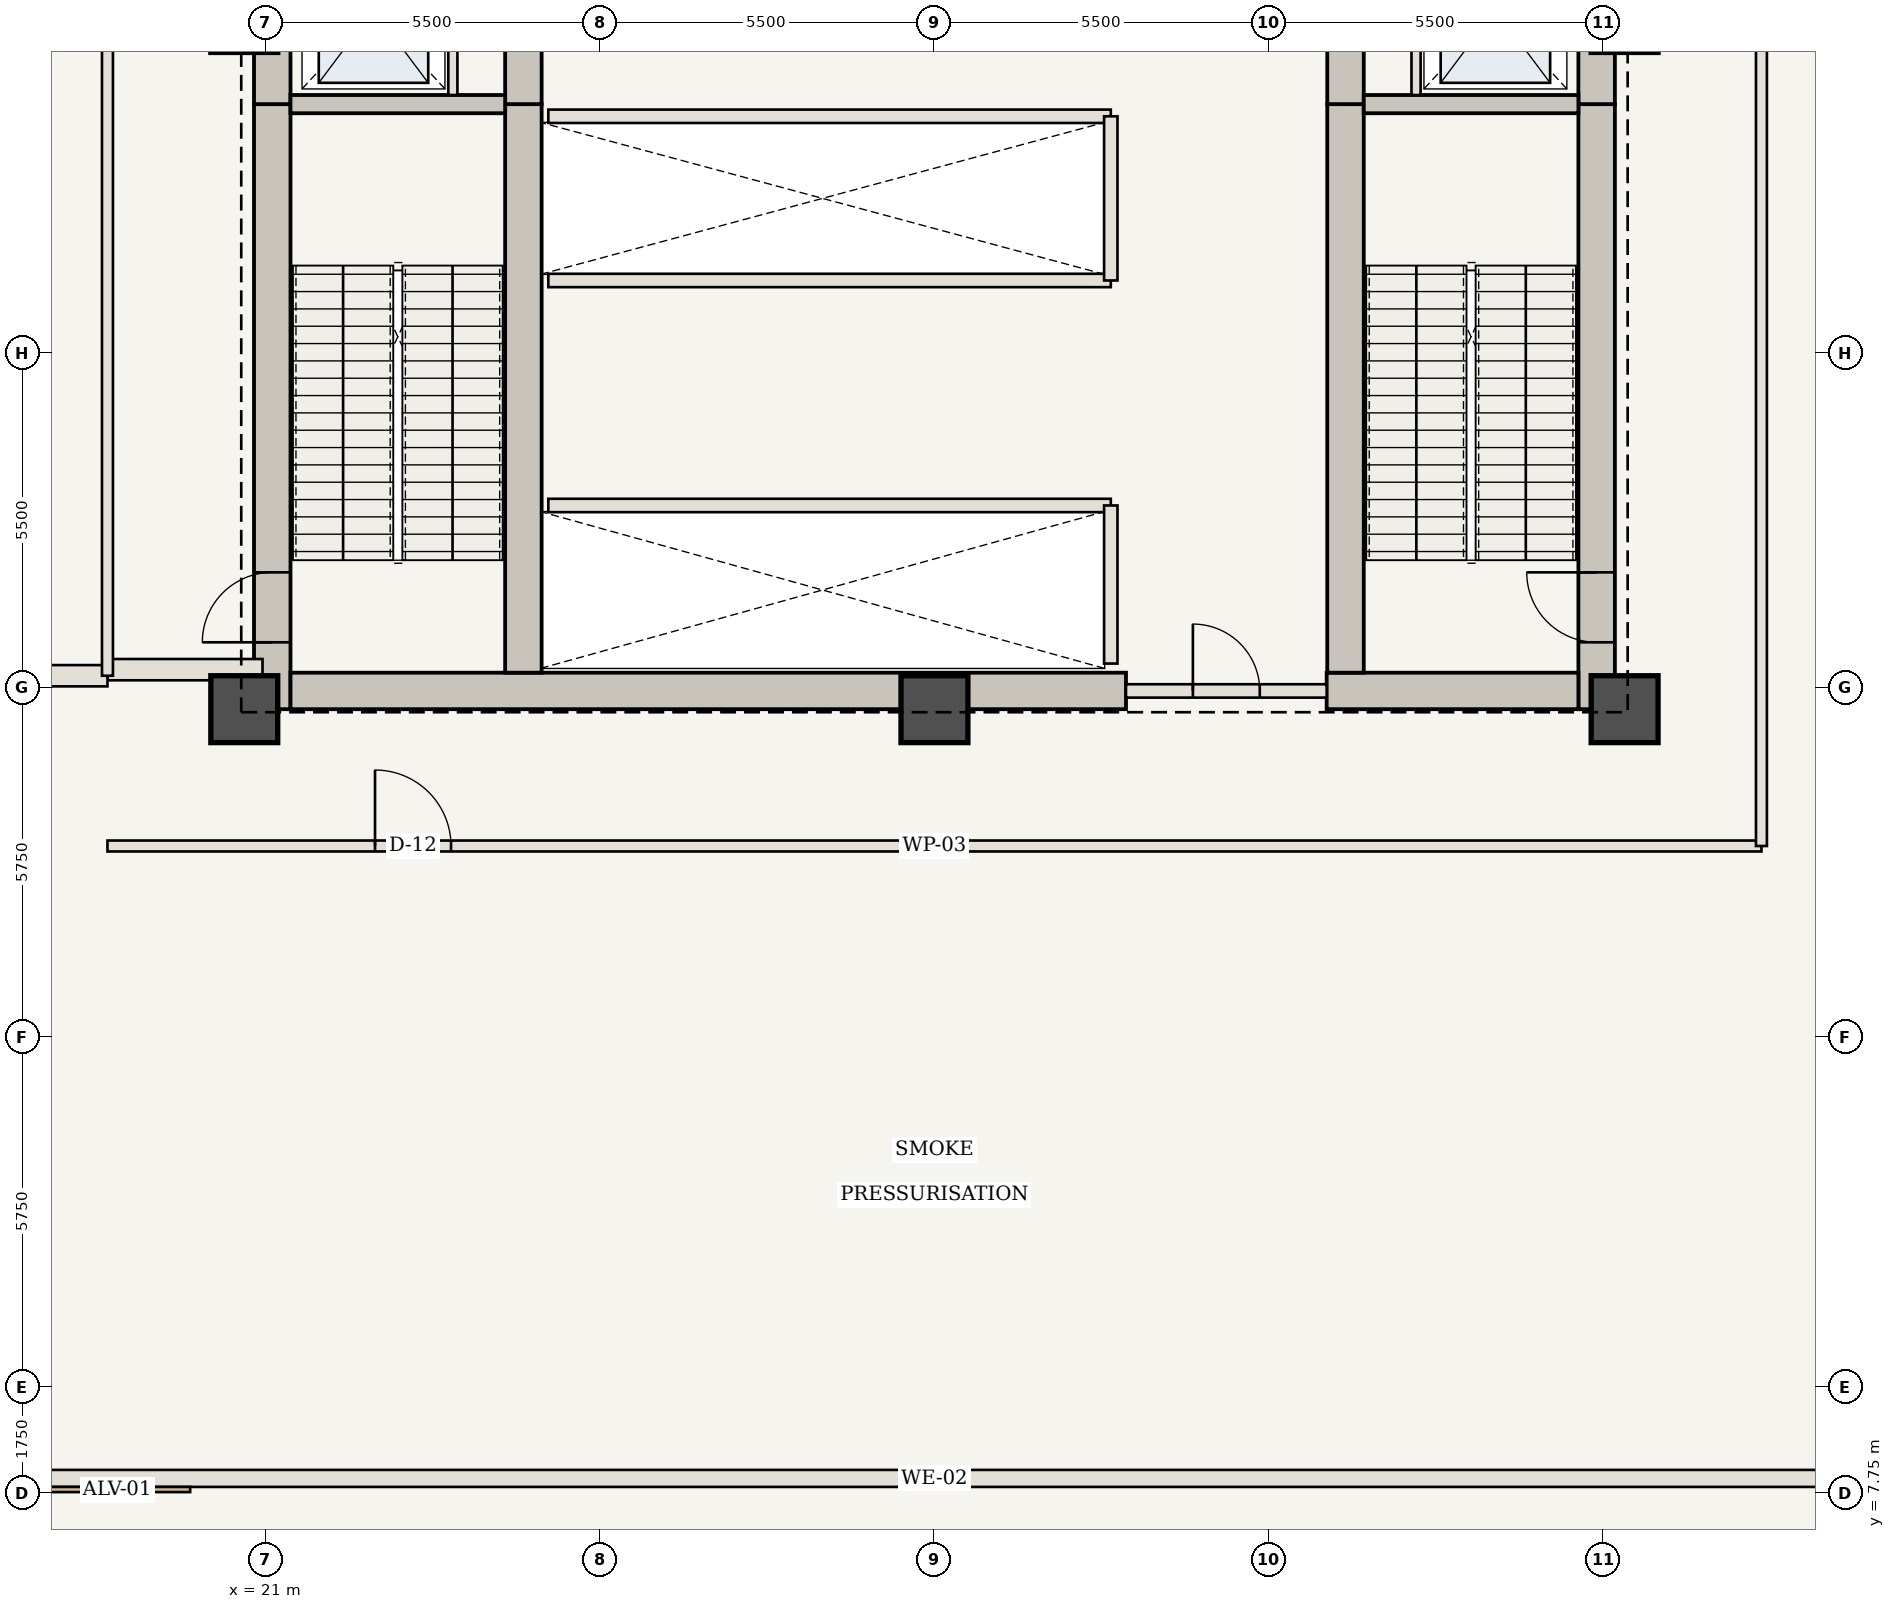
"""IFC4 building model, lengths in metres.
Left out: names, types, materials, properties, quantities, classifications, styles, units other than length and angle.
Written with IfcOpenShell. Run it as: python <this file> out.ifc"""

import sys

from ifc_helpers import new_model, si_unit, direction, frame, frame_2d, origin, origin_2d, place, context, subcontext, project, spatial, rectangle, extrude, element, fill, save


model = new_model("IFC4")
c1 = context("Model", 3, precision=1e-05, world=origin(), true_north=direction((0.0, 1.0)))
c2 = subcontext(c1, "Body", "Model", "MODEL_VIEW")
j1 = project(units=[si_unit("LENGTHUNIT", "METRE"), si_unit("PLANEANGLEUNIT", "RADIAN")], contexts=[c1])
p1 = place(None, origin())
s1 = spatial("IfcSite", under=j1, at=p1, CompositionType="ELEMENT")
p2 = place(p1, origin())
s2 = spatial("IfcBuilding", under=s1, at=p2, CompositionType="ELEMENT")
p3 = place(p2, frame((0.0, 0.0, 99.75)))
s3 = spatial("IfcBuildingStorey", under=s2, at=p3, CompositionType="ELEMENT", Elevation=99.75)
p4 = place(p3, frame((21.11, 20.65, 0.0), z_axis=(0.0, 0.0, 1.0), x_axis=(0.0, 1.0, 0.0)))
e1 = element("IfcWall", 1, at=p4, inside=s3, PredefinedType="SHEAR", context=c2, shape_type="SweptSolid", body=[
    extrude(rectangle(XDim=9.95, YDim=0.6, at=frame_2d((4.975, 0.0))), origin(), (0.0, 0.0, 1.0), 6.3),
])
p5 = place(p4, frame((1.1, 0.0, 0.0)))
e2 = element("IfcOpeningElement", 2, at=p5, cuts=e1, PredefinedType="OPENING", context=c2, shape_type="SweptSolid", body=[
    extrude(rectangle(XDim=1.15, YDim=2.15, at=frame_2d((0.575, 1.075))), frame((0.0, 0.31, 0.0), z_axis=(0.0, -1.0, 0.0), x_axis=(1.0, 0.0, 0.0)), (0.0, 0.0, 1.0), 0.62),
])
p6 = place(p3, frame((21.11, 30.6, 0.0), z_axis=(0.0, 0.0, 1.0), x_axis=(0.0, 1.0, 0.0)))
e3 = element("IfcWall", 3, at=p6, inside=s3, PredefinedType="SHEAR", context=c2, shape_type="SweptSolid", body=[
    extrude(rectangle(XDim=12.7, YDim=0.6, at=frame_2d((6.35, 0.0))), origin(), (0.0, 0.0, 1.0), 6.3),
])
p7 = place(p6, frame((4.2, 0.0, 0.0)))
e4 = element("IfcOpeningElement", 4, at=p7, cuts=e3, PredefinedType="OPENING", context=c2, shape_type="SweptSolid", body=[
    extrude(rectangle(XDim=1.1, YDim=2.15, at=frame_2d((0.55, 1.075))), frame((0.0, 0.31, 0.0), z_axis=(0.0, -1.0, 0.0), x_axis=(1.0, 0.0, 0.0)), (0.0, 0.0, 1.0), 0.62),
])
p8 = place(p6, frame((9.2, 0.0, 0.0)))
e5 = element("IfcOpeningElement", 5, at=p8, cuts=e3, PredefinedType="OPENING", context=c2, shape_type="SweptSolid", body=[
    extrude(rectangle(XDim=0.92, YDim=2.1, at=frame_2d((0.46, 1.05))), frame((0.0, 0.31, 0.0), z_axis=(0.0, -1.0, 0.0), x_axis=(1.0, 0.0, 0.0)), (0.0, 0.0, 1.0), 0.62),
])
p9 = place(p3, frame((42.89, 20.65, 0.0), z_axis=(0.0, 0.0, 1.0), x_axis=(0.0, 1.0, 0.0)))
e6 = element("IfcWall", 6, at=p9, inside=s3, PredefinedType="SHEAR", context=c2, shape_type="SweptSolid", body=[
    extrude(rectangle(XDim=9.95, YDim=0.6, at=frame_2d((4.975, 0.0))), origin(), (0.0, 0.0, 1.0), 6.3),
])
p10 = place(p9, frame((1.1, 0.0, 0.0)))
e7 = element("IfcOpeningElement", 7, at=p10, cuts=e6, PredefinedType="OPENING", context=c2, shape_type="SweptSolid", body=[
    extrude(rectangle(XDim=1.15, YDim=2.15, at=frame_2d((0.575, 1.075))), frame((0.0, 0.31, 0.0), z_axis=(0.0, -1.0, 0.0), x_axis=(1.0, 0.0, 0.0)), (0.0, 0.0, 1.0), 0.62),
])
p11 = place(p3, frame((42.89, 30.6, 0.0), z_axis=(0.0, 0.0, 1.0), x_axis=(0.0, 1.0, 0.0)))
e8 = element("IfcWall", 8, at=p11, inside=s3, PredefinedType="SHEAR", context=c2, shape_type="SweptSolid", body=[
    extrude(rectangle(XDim=12.7, YDim=0.6, at=frame_2d((6.35, 0.0))), origin(), (0.0, 0.0, 1.0), 6.3),
])
p12 = place(p11, frame((4.2, 0.0, 0.0)))
e9 = element("IfcOpeningElement", 9, at=p12, cuts=e8, PredefinedType="OPENING", context=c2, shape_type="SweptSolid", body=[
    extrude(rectangle(XDim=1.1, YDim=2.15, at=frame_2d((0.55, 1.075))), frame((0.0, 0.31, 0.0), z_axis=(0.0, -1.0, 0.0), x_axis=(1.0, 0.0, 0.0)), (0.0, 0.0, 1.0), 0.62),
])
p13 = place(p11, frame((8.05, 0.0, 0.0)))
e10 = element("IfcOpeningElement", 10, at=p13, cuts=e8, PredefinedType="OPENING", context=c2, shape_type="SweptSolid", body=[
    extrude(rectangle(XDim=0.88, YDim=2.1, at=frame_2d((0.44, 1.05))), frame((0.0, 0.31, 0.0), z_axis=(0.0, -1.0, 0.0), x_axis=(1.0, 0.0, 0.0)), (0.0, 0.0, 1.0), 0.62),
])
p14 = place(p11, frame((9.45, 0.0, 0.0)))
e11 = element("IfcOpeningElement", 11, at=p14, cuts=e8, PredefinedType="OPENING", context=c2, shape_type="SweptSolid", body=[
    extrude(rectangle(XDim=0.88, YDim=2.1, at=frame_2d((0.44, 1.05))), frame((0.0, 0.31, 0.0), z_axis=(0.0, -1.0, 0.0), x_axis=(1.0, 0.0, 0.0)), (0.0, 0.0, 1.0), 0.62),
])
p15 = place(p11, frame((10.85, 0.0, 0.0)))
e12 = element("IfcOpeningElement", 12, at=p15, cuts=e8, PredefinedType="OPENING", context=c2, shape_type="SweptSolid", body=[
    extrude(rectangle(XDim=0.88, YDim=2.1, at=frame_2d((0.44, 1.05))), frame((0.0, 0.31, 0.0), z_axis=(0.0, -1.0, 0.0), x_axis=(1.0, 0.0, 0.0)), (0.0, 0.0, 1.0), 0.62),
])
p16 = place(p3, frame((21.41, 20.95, 0.0), z_axis=(0.0, 0.0, 1.0), x_axis=(1.0, 0.0, 0.0)))
e13 = element("IfcWall", 13, at=p16, inside=s3, PredefinedType="SHEAR", context=c2, shape_type="SweptSolid", body=[
    extrude(rectangle(XDim=13.74, YDim=0.6, at=frame_2d((6.87, 0.0))), origin(), (0.0, 0.0, 1.0), 6.3),
])
p17 = place(p3, frame((38.45, 20.95, 0.0), z_axis=(0.0, 0.0, 1.0), x_axis=(1.0, 0.0, 0.0)))
e14 = element("IfcWall", 14, at=p17, inside=s3, PredefinedType="SHEAR", context=c2, shape_type="SweptSolid", body=[
    extrude(rectangle(XDim=4.14, YDim=0.6, at=frame_2d((2.07, 0.0))), origin(), (0.0, 0.0, 1.0), 6.3),
])
p18 = place(p3, frame((25.24, 21.25, 0.0), z_axis=(0.0, 0.0, 1.0), x_axis=(0.0, 1.0, 0.0)))
e15 = element("IfcWall", 15, at=p18, inside=s3, PredefinedType="SHEAR", context=c2, shape_type="SweptSolid", body=[
    extrude(rectangle(XDim=9.35, YDim=0.6, at=frame_2d((4.675, 0.0))), origin(), (0.0, 0.0, 1.0), 6.3),
])
p19 = place(p3, frame((25.24, 30.6, 0.0), z_axis=(0.0, 0.0, 1.0), x_axis=(0.0, 1.0, 0.0)))
e16 = element("IfcWall", 16, at=p19, inside=s3, PredefinedType="SHEAR", context=c2, shape_type="SweptSolid", body=[
    extrude(rectangle(XDim=12.1, YDim=0.6, at=frame_2d((6.05, 0.0))), origin(), (0.0, 0.0, 1.0), 6.3),
])
p20 = place(p19, frame((6.25, 0.0, 0.0)))
e17 = element("IfcOpeningElement", 17, at=p20, cuts=e16, PredefinedType="OPENING", context=c2, shape_type="SweptSolid", body=[
    extrude(rectangle(XDim=1.1, YDim=2.15, at=frame_2d((0.55, 1.075))), frame((0.0, 0.31, 0.0), z_axis=(0.0, -1.0, 0.0), x_axis=(1.0, 0.0, 0.0)), (0.0, 0.0, 1.0), 0.62),
])
p21 = place(p3, frame((38.76, 21.25, 0.0), z_axis=(0.0, 0.0, 1.0), x_axis=(0.0, 1.0, 0.0)))
e18 = element("IfcWall", 18, at=p21, inside=s3, PredefinedType="SHEAR", context=c2, shape_type="SweptSolid", body=[
    extrude(rectangle(XDim=9.35, YDim=0.6, at=frame_2d((4.675, 0.0))), origin(), (0.0, 0.0, 1.0), 6.3),
])
p22 = place(p3, frame((38.76, 30.6, 0.0), z_axis=(0.0, 0.0, 1.0), x_axis=(0.0, 1.0, 0.0)))
e19 = element("IfcWall", 19, at=p22, inside=s3, PredefinedType="SHEAR", context=c2, shape_type="SweptSolid", body=[
    extrude(rectangle(XDim=12.1, YDim=0.6, at=frame_2d((6.05, 0.0))), origin(), (0.0, 0.0, 1.0), 6.3),
])
for number, where, z_axis, x_axis in (
    (20, (20.65, 20.65, 0.0), (0.0, 0.0, 1.0), (1.0, 0.0, 0.0)),
    (21, (32.0, 20.65, 0.0), (0.0, 0.0, 1.0), (1.0, 0.0, 0.0)),
    (22, (43.35, 20.65, 0.0), (0.0, 0.0, 1.0), (1.0, 0.0, 0.0)),
):
    element("IfcColumn", number, at=place(p3, frame(where, z_axis=z_axis, x_axis=x_axis)), inside=s3, PredefinedType="COLUMN", context=c2, shape_type="SweptSolid", body=[
        extrude(rectangle(XDim=1.1, YDim=1.1, at=origin_2d()), origin(), (0.0, 0.0, 1.0), 5.88),
    ])
for number, where, z_axis, x_axis in (
    (23, (21.41, 30.6, 0.0), (0.0, 0.0, 1.0), (1.0, 0.0, 0.0)),
    (24, (39.06, 30.6, 0.0), (0.0, 0.0, 1.0), (1.0, 0.0, 0.0)),
):
    element("IfcWall", number, at=place(p3, frame(where, z_axis=z_axis, x_axis=x_axis)), inside=s3, PredefinedType="SHEAR", context=c2, shape_type="SweptSolid", body=[
        extrude(rectangle(XDim=3.53, YDim=0.3, at=frame_2d((1.765, 0.0))), origin(), (0.0, 0.0, 1.0), 5.88),
    ])
for number, where, z_axis, x_axis in (
    (25, (24.08, 30.75, 0.0), (0.0, 0.0, 1.0), (0.0, 1.0, 0.0)),
    (26, (39.92, 30.75, 0.0), (0.0, 0.0, 1.0), (0.0, 1.0, 0.0)),
):
    element("IfcWall", number, at=place(p3, frame(where, z_axis=z_axis, x_axis=x_axis)), inside=s3, PredefinedType="STANDARD", context=c2, shape_type="SweptSolid", body=[
        extrude(rectangle(XDim=2.65, YDim=0.15, at=frame_2d((1.325, 0.0))), origin(), (0.0, 0.0, 1.0), 5.88),
    ])
p23 = place(p3, frame((35.15, 20.95, 0.0), z_axis=(0.0, 0.0, 1.0), x_axis=(1.0, 0.0, 0.0)))
e27 = element("IfcWall", 27, at=p23, inside=s3, PredefinedType="STANDARD", context=c2, shape_type="SweptSolid", body=[
    extrude(rectangle(XDim=3.3, YDim=0.22, at=frame_2d((1.65, 0.0))), origin(), (0.0, 0.0, 1.0), 5.88),
])
p24 = place(p23, frame((1.1, 0.0, 0.0)))
e28 = element("IfcOpeningElement", 28, at=p24, cuts=e27, PredefinedType="OPENING", context=c2, shape_type="SweptSolid", body=[
    extrude(rectangle(XDim=1.1, YDim=2.15, at=frame_2d((0.55, 1.075))), frame((0.0, 0.12, 0.0), z_axis=(0.0, -1.0, 0.0), x_axis=(1.0, 0.0, 0.0)), (0.0, 0.0, 1.0), 0.24),
])
p25 = place(p3, frame((25.65, 24.0, 0.0), z_axis=(0.0, 0.0, 1.0), x_axis=(1.0, 0.0, 0.0)))
e29 = element("IfcWall", 29, at=p25, inside=s3, PredefinedType="STANDARD", context=c2, shape_type="SweptSolid", body=[
    extrude(rectangle(XDim=9.25, YDim=0.22, at=frame_2d((4.625, 0.0))), origin(), (0.0, 0.0, 1.0), 5.88),
])
p26 = place(p3, frame((34.9, 21.4, 0.0), z_axis=(0.0, 0.0, 1.0), x_axis=(0.0, 1.0, 0.0)))
e30 = element("IfcWall", 30, at=p26, inside=s3, PredefinedType="STANDARD", context=c2, shape_type="SweptSolid", body=[
    extrude(rectangle(XDim=2.6, YDim=0.22, at=frame_2d((1.3, 0.0))), origin(), (0.0, 0.0, 1.0), 5.88),
])
for number, where, z_axis, x_axis in (
    (31, (25.65, 27.7, 0.0), (0.0, 0.0, 1.0), (1.0, 0.0, 0.0)),
    (32, (25.65, 30.4, 0.0), (0.0, 0.0, 1.0), (1.0, 0.0, 0.0)),
):
    element("IfcWall", number, at=place(p3, frame(where, z_axis=z_axis, x_axis=x_axis)), inside=s3, PredefinedType="STANDARD", context=c2, shape_type="SweptSolid", body=[
        extrude(rectangle(XDim=9.25, YDim=0.22, at=frame_2d((4.625, 0.0))), origin(), (0.0, 0.0, 1.0), 5.88),
    ])
p27 = place(p3, frame((34.9, 27.7, 0.0), z_axis=(0.0, 0.0, 1.0), x_axis=(0.0, 1.0, 0.0)))
e33 = element("IfcWall", 33, at=p27, inside=s3, PredefinedType="STANDARD", context=c2, shape_type="SweptSolid", body=[
    extrude(rectangle(XDim=2.7, YDim=0.22, at=frame_2d((1.35, 0.0))), origin(), (0.0, 0.0, 1.0), 5.88),
])
p28 = place(p3, frame((18.4, 21.3, 0.0), z_axis=(0.0, 0.0, 1.0), x_axis=(1.0, 0.0, 0.0)))
e34 = element("IfcWall", 34, at=p28, inside=s3, PredefinedType="STANDARD", context=c2, shape_type="SweptSolid", body=[
    extrude(rectangle(XDim=2.55, YDim=0.35, at=frame_2d((1.275, 0.0))), origin(), (0.0, 0.0, 1.0), 3.908),
])
p29 = place(p3, frame((18.4, 18.4, 0.0), z_axis=(0.0, 0.0, 1.0), x_axis=(1.0, 0.0, 0.0)))
e35 = element("IfcWall", 35, at=p29, inside=s3, PredefinedType="STANDARD", context=c2, shape_type="SweptSolid", body=[
    extrude(rectangle(XDim=27.2, YDim=0.18, at=frame_2d((13.6, 0.0))), origin(), (0.0, 0.0, 1.0), 5.88),
])
p30 = place(p29, frame((4.4, 0.0, 0.0)))
e36 = element("IfcOpeningElement", 36, at=p30, cuts=e35, PredefinedType="OPENING", context=c2, shape_type="SweptSolid", body=[
    extrude(rectangle(XDim=1.25, YDim=2.2, at=frame_2d((0.625, 1.1))), frame((0.0, 0.1, 0.0), z_axis=(0.0, -1.0, 0.0), x_axis=(1.0, 0.0, 0.0)), (0.0, 0.0, 1.0), 0.2),
])
p31 = place(p3, frame((8.05, 21.2, 0.0), z_axis=(0.0, 0.0, 1.0), x_axis=(1.0, 0.0, 0.0)))
e37 = element("IfcWall", 37, at=p31, inside=s3, PredefinedType="STANDARD", context=c2, shape_type="SweptSolid", body=[
    extrude(rectangle(XDim=10.35, YDim=0.35, at=frame_2d((5.175, 0.0))), origin(), (0.0, 0.0, 1.0), 3.908),
])
p32 = place(p3, frame((18.4, 21.2, 0.0), z_axis=(0.0, 0.0, 1.0), x_axis=(0.0, 1.0, 0.0)))
e38 = element("IfcWall", 38, at=p32, inside=s3, PredefinedType="STANDARD", context=c2, shape_type="SweptSolid", body=[
    extrude(rectangle(XDim=21.6, YDim=0.18, at=frame_2d((10.8, 0.0))), origin(), (0.0, 0.0, 1.0), 5.88),
])
p33 = place(p32, frame((11.75, 0.0, 0.0)))
e39 = element("IfcOpeningElement", 39, at=p33, cuts=e38, PredefinedType="OPENING", context=c2, shape_type="SweptSolid", body=[
    extrude(rectangle(XDim=1.1, YDim=2.15, at=frame_2d((0.55, 1.075))), frame((0.0, 0.1, 0.0), z_axis=(0.0, -1.0, 0.0), x_axis=(1.0, 0.0, 0.0)), (0.0, 0.0, 1.0), 0.2),
])
p34 = place(p3, frame((45.6, 18.4, 0.0), z_axis=(0.0, 0.0, 1.0), x_axis=(0.0, 1.0, 0.0)))
e40 = element("IfcWall", 40, at=p34, inside=s3, PredefinedType="STANDARD", context=c2, shape_type="SweptSolid", body=[
    extrude(rectangle(XDim=27.2, YDim=0.18, at=frame_2d((13.6, 0.0))), origin(), (0.0, 0.0, 1.0), 5.88),
])
p35 = place(p34, frame((14.55, 0.0, 0.0)))
e41 = element("IfcOpeningElement", 41, at=p35, cuts=e40, PredefinedType="OPENING", context=c2, shape_type="SweptSolid", body=[
    extrude(rectangle(XDim=1.25, YDim=2.2, at=frame_2d((0.625, 1.1))), frame((0.0, 0.1, 0.0), z_axis=(0.0, -1.0, 0.0), x_axis=(1.0, 0.0, 0.0)), (0.0, 0.0, 1.0), 0.2),
])
p36 = place(p3, frame((56.0, 8.0, 0.0), z_axis=(0.0, 0.0, 1.0), x_axis=(-1.0, 0.0, 0.0)))
e42 = element("IfcWall", 42, at=p36, inside=s3, PredefinedType="USERDEFINED", context=c2, shape_type="SweptSolid", body=[
    extrude(rectangle(XDim=48.0, YDim=0.28, at=frame_2d((24.0, 0.0))), origin(), (0.0, 0.0, 1.0), 3.88),
])
p37 = place(p5, origin())
e43 = element("IfcDoor", 43, at=p37, inside=s3, OperationType="SINGLE_SWING_LEFT", PredefinedType="DOOR", context=c2, shape_type="SweptSolid", body=[
    extrude(rectangle(XDim=1.15, YDim=2.15, at=frame_2d((0.575, 1.075))), frame((0.0, 0.025, 0.0), z_axis=(0.0, -1.0, 0.0), x_axis=(1.0, 0.0, 0.0)), (0.0, 0.0, 1.0), 0.05),
])
fill(e2, e43)
p38 = place(p10, origin())
e44 = element("IfcDoor", 44, at=p38, inside=s3, OperationType="SINGLE_SWING_RIGHT", PredefinedType="DOOR", context=c2, shape_type="SweptSolid", body=[
    extrude(rectangle(XDim=1.15, YDim=2.15, at=frame_2d((0.575, 1.075))), frame((0.0, 0.025, 0.0), z_axis=(0.0, -1.0, 0.0), x_axis=(1.0, 0.0, 0.0)), (0.0, 0.0, 1.0), 0.05),
])
fill(e7, e44)
p39 = place(p24, origin())
e45 = element("IfcDoor", 45, at=p39, inside=s3, OperationType="SINGLE_SWING_LEFT", PredefinedType="DOOR", context=c2, shape_type="SweptSolid", body=[
    extrude(rectangle(XDim=1.1, YDim=2.15, at=frame_2d((0.55, 1.075))), frame((0.0, 0.025, 0.0), z_axis=(0.0, -1.0, 0.0), x_axis=(1.0, 0.0, 0.0)), (0.0, 0.0, 1.0), 0.05),
])
fill(e28, e45)
p40 = place(p30, origin())
e46 = element("IfcDoor", 46, at=p40, inside=s3, OperationType="SINGLE_SWING_LEFT", PredefinedType="DOOR", context=c2, shape_type="SweptSolid", body=[
    extrude(rectangle(XDim=1.25, YDim=2.2, at=frame_2d((0.625, 1.1))), frame((0.0, 0.025, 0.0), z_axis=(0.0, -1.0, 0.0), x_axis=(1.0, 0.0, 0.0)), (0.0, 0.0, 1.0), 0.05),
])
fill(e36, e46)
save(model, sys.argv[1])
